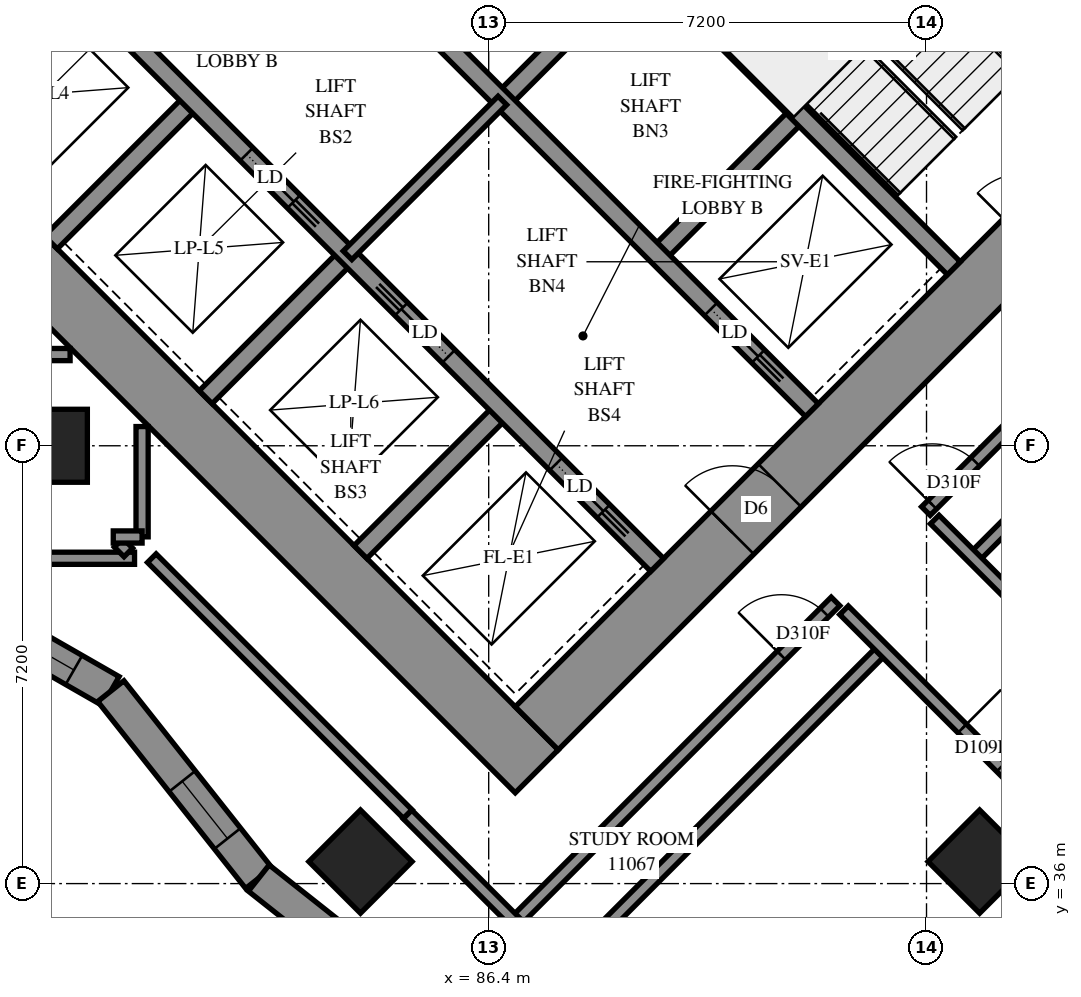
"""IFC4 building model, lengths in metres.
Left out: names, types, materials, properties, quantities, classifications, styles, units other than length and angle.
Written with IfcOpenShell. Run it as: python <this file> out.ifc"""

import sys

from ifc_helpers import new_model, si_unit, direction, frame, frame_2d, origin, origin_2d, place, context, subcontext, project, spatial, polyline, rectangle, outline, extrude, element, fill, save


model = new_model("IFC4")
c1 = context("Model", 3, precision=1e-05, world=origin(), true_north=direction((0.0, 1.0)))
c2 = subcontext(c1, "Body", "Model", "MODEL_VIEW")
j1 = project(units=[si_unit("LENGTHUNIT", "METRE"), si_unit("PLANEANGLEUNIT", "RADIAN")], contexts=[c1])
p1 = place(None, origin())
s1 = spatial("IfcSite", under=j1, at=p1, CompositionType="ELEMENT")
p2 = place(p1, origin())
s2 = spatial("IfcBuilding", under=s1, at=p2, CompositionType="ELEMENT")
p3 = place(p2, frame((0.0, 0.0, 44.0)))
s3 = spatial("IfcBuildingStorey", under=s2, at=p3, CompositionType="ELEMENT", Elevation=44.0)
for number, where, z_axis, x_axis in (
    (1, (79.2, 43.2, 0.0), (0.0, 0.0, 1.0), (1.0, 0.0, 0.0)),
    (2, (84.291, 36.362, 0.0), (0.0, 0.0, 1.0), (0.707, -0.707, 0.0)),
    (3, (94.474, 36.362, 0.0), (0.0, 0.0, 1.0), (0.707, -0.707, 0.0)),
):
    element("IfcColumn", number, at=place(p3, frame(where, z_axis=z_axis, x_axis=x_axis)), inside=s3, PredefinedType="COLUMN", context=c2, shape_type="SweptSolid", body=[
        extrude(rectangle(XDim=1.2, YDim=1.2, at=origin_2d()), origin(), (0.0, 0.0, 1.0), 3.1),
    ])
p4 = place(p3, frame((75.594, 49.443, -0.3), z_axis=(0.0, 0.0, 1.0), x_axis=(0.7071037324, -0.70710983, 0.0)))
e4 = element("IfcWall", 4, at=p4, inside=s3, PredefinedType="SHEAR", context=c2, shape_type="SweptSolid", body=[
    extrude(rectangle(XDim=16.4, YDim=1.0, at=frame_2d((8.2, 0.0))), origin(), (0.0, 0.0, 1.0), 2.7),
])
p5 = place(p3, frame((86.483, 60.333, -0.3), z_axis=(0.0, 0.0, 1.0), x_axis=(0.70710983, -0.7071037324, 0.0)))
e5 = element("IfcWall", 5, at=p5, inside=s3, PredefinedType="SHEAR", context=c2, shape_type="SweptSolid", body=[
    extrude(rectangle(XDim=16.4, YDim=1.0, at=frame_2d((8.2, 0.0))), origin(), (0.0, 0.0, 1.0), 2.7),
])
p6 = place(p5, frame((11.0, 0.0, 0.3)))
e6 = element("IfcOpeningElement", 6, at=p6, cuts=e5, PredefinedType="OPENING", context=c2, shape_type="SweptSolid", body=[
    extrude(rectangle(XDim=0.8, YDim=2.1, at=frame_2d((0.4, 1.05))), frame((0.0, 0.51, 0.0), z_axis=(0.0, -1.0, 0.0), x_axis=(1.0, 0.0, 0.0)), (0.0, 0.0, 1.0), 1.02),
])
p7 = place(p3, frame((76.301, 49.443, -0.3), z_axis=(0.0, 0.0, 1.0), x_axis=(0.7071067812, 0.7071067812, 0.0)))
e7 = element("IfcWall", 7, at=p7, inside=s3, PredefinedType="SHEAR", context=c2, shape_type="SweptSolid", body=[
    extrude(rectangle(XDim=14.4, YDim=1.0, at=frame_2d((7.2, 0.0))), origin(), (0.0, 0.0, 1.0), 2.7),
])
p8 = place(p7, frame((4.55, 0.0, 0.3)))
e8 = element("IfcOpeningElement", 8, at=p8, cuts=e7, PredefinedType="OPENING", context=c2, shape_type="SweptSolid", body=[
    extrude(rectangle(XDim=1.1, YDim=2.1, at=frame_2d((0.55, 1.05))), frame((0.0, 0.51, 0.0), z_axis=(0.0, -1.0, 0.0), x_axis=(1.0, 0.0, 0.0)), (0.0, 0.0, 1.0), 1.02),
])
p9 = place(p7, frame((11.35, 0.0, 0.3)))
e9 = element("IfcOpeningElement", 9, at=p9, cuts=e7, PredefinedType="OPENING", context=c2, shape_type="SweptSolid", body=[
    extrude(rectangle(XDim=1.1, YDim=2.1, at=frame_2d((0.55, 1.05))), frame((0.0, 0.51, 0.0), z_axis=(0.0, -1.0, 0.0), x_axis=(1.0, 0.0, 0.0)), (0.0, 0.0, 1.0), 1.02),
])
p10 = place(p3, frame((87.19, 38.554, -0.3), z_axis=(0.0, 0.0, 1.0), x_axis=(0.707103309, 0.7071102534, 0.0)))
e10 = element("IfcWall", 10, at=p10, inside=s3, PredefinedType="SHEAR", context=c2, shape_type="SweptSolid", body=[
    extrude(rectangle(XDim=14.4, YDim=1.0, at=frame_2d((7.2, 0.0))), origin(), (0.0, 0.0, 1.0), 2.7),
])
p11 = place(p10, frame((4.55, 0.0, 0.3)))
e11 = element("IfcOpeningElement", 11, at=p11, cuts=e10, PredefinedType="OPENING", context=c2, shape_type="SweptSolid", body=[
    extrude(rectangle(XDim=1.1, YDim=2.1, at=frame_2d((0.55, 1.05))), frame((0.0, 0.51, 0.0), z_axis=(0.0, -1.0, 0.0), x_axis=(1.0, 0.0, 0.0)), (0.0, 0.0, 1.0), 1.02),
])
p12 = place(p10, frame((11.35, 0.0, 0.3)))
e12 = element("IfcOpeningElement", 12, at=p12, cuts=e10, PredefinedType="OPENING", context=c2, shape_type="SweptSolid", body=[
    extrude(rectangle(XDim=1.1, YDim=2.1, at=frame_2d((0.55, 1.05))), frame((0.0, 0.51, 0.0), z_axis=(0.0, -1.0, 0.0), x_axis=(1.0, 0.0, 0.0)), (0.0, 0.0, 1.0), 1.02),
])
p13 = place(p3, frame((79.2, 46.544, 0.0), z_axis=(0.0, 0.0, 1.0), x_axis=(0.7071219326, 0.7070916295, 0.0)))
e13 = element("IfcWall", 13, at=p13, inside=s3, PredefinedType="SOLIDWALL", context=c2, shape_type="SweptSolid", body=[
    extrude(rectangle(XDim=3.3, YDim=0.3, at=frame_2d((1.65, 0.0))), origin(), (0.0, 0.0, 1.0), 3.1),
])
p14 = place(p3, frame((81.746, 43.999, 0.0), z_axis=(0.0, 0.0, 1.0), x_axis=(0.7071067812, 0.7071067812, 0.0)))
e14 = element("IfcWall", 14, at=p14, inside=s3, PredefinedType="SOLIDWALL", context=c2, shape_type="SweptSolid", body=[
    extrude(rectangle(XDim=3.3, YDim=0.3, at=frame_2d((1.65, 0.0))), origin(), (0.0, 0.0, 1.0), 3.1),
])
p15 = place(p3, frame((86.625, 48.878, 0.0), z_axis=(0.0, 0.0, 1.0), x_axis=(0.7071067812, 0.7071067812, 0.0)))
e15 = element("IfcWall", 15, at=p15, inside=s3, PredefinedType="SOLIDWALL", context=c2, shape_type="SweptSolid", body=[
    extrude(rectangle(XDim=3.3, YDim=0.3, at=frame_2d((1.65, 0.0))), origin(), (0.0, 0.0, 1.0), 3.1),
])
p16 = place(p3, frame((84.291, 41.453, 0.0), z_axis=(0.0, 0.0, 1.0), x_axis=(0.7071067812, 0.7071067812, 0.0)))
e16 = element("IfcWall", 16, at=p16, inside=s3, PredefinedType="SOLIDWALL", context=c2, shape_type="SweptSolid", body=[
    extrude(rectangle(XDim=3.3, YDim=0.3, at=frame_2d((1.65, 0.0))), origin(), (0.0, 0.0, 1.0), 3.1),
])
p17 = place(p3, frame((89.17, 46.332, 0.0), z_axis=(0.0, 0.0, 1.0), x_axis=(0.7071067812, 0.7071067812, 0.0)))
e17 = element("IfcWall", 17, at=p17, inside=s3, PredefinedType="SOLIDWALL", context=c2, shape_type="SweptSolid", body=[
    extrude(rectangle(XDim=3.3, YDim=0.3, at=frame_2d((1.65, 0.0))), origin(), (0.0, 0.0, 1.0), 3.1),
])
p18 = place(p3, frame((78.988, 51.423, 0.0), z_axis=(0.0, 0.0, 1.0), x_axis=(0.7071067812, -0.7071067812, 0.0)))
e18 = element("IfcWall", 18, at=p18, inside=s3, PredefinedType="SOLIDWALL", context=c2, shape_type="SweptSolid", body=[
    extrude(rectangle(XDim=14.4, YDim=0.3, at=frame_2d((7.2, 0.0))), origin(), (0.0, 0.0, 1.0), 3.1),
])
p19 = place(p18, frame((1.25, 0.0, 0.0)))
e19 = element("IfcOpeningElement", 19, at=p19, cuts=e18, PredefinedType="OPENING", context=c2, shape_type="SweptSolid", body=[
    extrude(rectangle(XDim=1.1, YDim=2.1, at=frame_2d((0.55, 1.05))), frame((0.0, 0.16, 0.0), z_axis=(0.0, -1.0, 0.0), x_axis=(1.0, 0.0, 0.0)), (0.0, 0.0, 1.0), 0.32),
])
p20 = place(p18, frame((4.85, 0.0, 0.0)))
e20 = element("IfcOpeningElement", 20, at=p20, cuts=e18, PredefinedType="OPENING", context=c2, shape_type="SweptSolid", body=[
    extrude(rectangle(XDim=1.1, YDim=2.1, at=frame_2d((0.55, 1.05))), frame((0.0, 0.16, 0.0), z_axis=(0.0, -1.0, 0.0), x_axis=(1.0, 0.0, 0.0)), (0.0, 0.0, 1.0), 0.32),
])
p21 = place(p18, frame((8.45, 0.0, 0.0)))
e21 = element("IfcOpeningElement", 21, at=p21, cuts=e18, PredefinedType="OPENING", context=c2, shape_type="SweptSolid", body=[
    extrude(rectangle(XDim=1.1, YDim=2.1, at=frame_2d((0.55, 1.05))), frame((0.0, 0.16, 0.0), z_axis=(0.0, -1.0, 0.0), x_axis=(1.0, 0.0, 0.0)), (0.0, 0.0, 1.0), 0.32),
])
p22 = place(p18, frame((12.05, 0.0, 0.0)))
e22 = element("IfcOpeningElement", 22, at=p22, cuts=e18, PredefinedType="OPENING", context=c2, shape_type="SweptSolid", body=[
    extrude(rectangle(XDim=1.1, YDim=2.1, at=frame_2d((0.55, 1.05))), frame((0.0, 0.16, 0.0), z_axis=(0.0, -1.0, 0.0), x_axis=(1.0, 0.0, 0.0)), (0.0, 0.0, 1.0), 0.32),
])
p23 = place(p3, frame((81.534, 53.969, 0.0), z_axis=(0.0, 0.0, 1.0), x_axis=(0.707103309, -0.7071102534, 0.0)))
e23 = element("IfcWall", 23, at=p23, inside=s3, PredefinedType="SOLIDWALL", context=c2, shape_type="SweptSolid", body=[
    extrude(rectangle(XDim=14.4, YDim=0.3, at=frame_2d((7.2, 0.0))), origin(), (0.0, 0.0, 1.0), 3.1),
])
p24 = place(p23, frame((12.05, 0.0, 0.0)))
e24 = element("IfcOpeningElement", 24, at=p24, cuts=e23, PredefinedType="OPENING", context=c2, shape_type="SweptSolid", body=[
    extrude(rectangle(XDim=1.1, YDim=2.1, at=frame_2d((0.55, 1.05))), frame((0.0, 0.16, 0.0), z_axis=(0.0, -1.0, 0.0), x_axis=(1.0, 0.0, 0.0)), (0.0, 0.0, 1.0), 0.32),
])
p25 = place(p3, frame((88.958, 51.211, 0.0), z_axis=(0.0, 0.0, 1.0), x_axis=(0.7070998367, -0.7071137256, 0.0)))
e25 = element("IfcWall", 25, at=p25, inside=s3, PredefinedType="SOLIDWALL", context=c2, shape_type="SweptSolid", body=[
    extrude(rectangle(XDim=7.2, YDim=0.3, at=frame_2d((3.6, 0.0))), origin(), (0.0, 0.0, 1.0), 3.1),
])
p26 = place(p3, frame((76.631, 41.203, 0.0), z_axis=(0.0, 0.0, 1.0), x_axis=(0.8675936053, -0.4972739044, 0.0)))
e26 = element("IfcWall", 26, at=p26, inside=s3, PredefinedType="SOLIDWALL", context=c2, shape_type="SweptSolid", body=[
    extrude(outline(polyline([(0.031, -0.275), (4.045, -0.275), (4.151, 0.275), (-0.031, 0.275), (0.031, -0.275)])), origin(), (0.0, 0.0, 1.0), 3.1),
])
p27 = place(p26, frame((2.198, 0.0, 0.5)))
e27 = element("IfcOpeningElement", 27, at=p27, cuts=e26, PredefinedType="OPENING", context=c2, shape_type="SweptSolid", body=[
    extrude(rectangle(XDim=1.2, YDim=2.45, at=frame_2d((0.6, 1.225))), frame((0.0, 0.285, 0.0), z_axis=(0.0, -1.0, 0.0), x_axis=(1.0, 0.0, 0.0)), (0.0, 0.0, 1.0), 0.57),
])
p28 = place(p26, frame((0.86, 0.0, 0.45)))
e28 = element("IfcOpeningElement", 28, at=p28, cuts=e26, PredefinedType="OPENING", context=c2, shape_type="SweptSolid", body=[
    extrude(rectangle(XDim=0.8, YDim=2.5, at=frame_2d((0.4, 1.25))), frame((0.0, 0.285, 0.0), z_axis=(0.0, -1.0, 0.0), x_axis=(1.0, 0.0, 0.0)), (0.0, 0.0, 1.0), 0.57),
])
p29 = place(p3, frame((80.186, 39.165, 0.0), z_axis=(0.0, 0.0, 1.0), x_axis=(0.6205840465, -0.7841399373, 0.0)))
e29 = element("IfcWall", 29, at=p29, inside=s3, PredefinedType="SOLIDWALL", context=c2, shape_type="SweptSolid", body=[
    extrude(outline(polyline([(0.053, -0.275), (3.953, -0.275), (3.889, 0.275), (-0.053, 0.275), (0.053, -0.275)])), origin(), (0.0, 0.0, 1.0), 3.1),
])
p30 = place(p29, frame((1.891, 0.0, 0.5)))
e30 = element("IfcOpeningElement", 30, at=p30, cuts=e29, PredefinedType="OPENING", context=c2, shape_type="SweptSolid", body=[
    extrude(rectangle(XDim=1.2, YDim=2.45, at=frame_2d((0.6, 1.225))), frame((0.0, 0.285, 0.0), z_axis=(0.0, -1.0, 0.0), x_axis=(1.0, 0.0, 0.0)), (0.0, 0.0, 1.0), 0.57),
])
p31 = place(p3, frame((82.619, 36.091, 0.0), z_axis=(0.0, 0.0, 1.0), x_axis=(0.7841326465, -0.6205932587, 0.0)))
e31 = element("IfcWall", 31, at=p31, inside=s3, PredefinedType="SOLIDWALL", context=c2, shape_type="SweptSolid", body=[
    extrude(outline(polyline([(-0.032, -0.275), (3.868, -0.275), (3.932, 0.275), (0.032, 0.275), (-0.032, -0.275)])), origin(), (0.0, 0.0, 1.0), 3.1),
])
p32 = place(p31, frame((1.749, 0.0, 0.5)))
e32 = element("IfcOpeningElement", 32, at=p32, cuts=e31, PredefinedType="OPENING", context=c2, shape_type="SweptSolid", body=[
    extrude(rectangle(XDim=1.2, YDim=2.45, at=frame_2d((0.6, 1.225))), frame((0.0, 0.285, 0.0), z_axis=(0.0, -1.0, 0.0), x_axis=(1.0, 0.0, 0.0)), (0.0, 0.0, 1.0), 0.57),
])
p33 = place(p3, frame((91.313, 53.354, 0.0), z_axis=(0.0, 0.0, 1.0), x_axis=(0.7071140275, -0.7070995348, 0.0)))
e33 = element("IfcWall", 33, at=p33, inside=s3, PredefinedType="PARTITIONING", context=c2, shape_type="SweptSolid", body=[
    extrude(rectangle(XDim=6.9, YDim=0.15, at=frame_2d((3.45, 0.0))), origin(), (0.0, 0.0, 1.0), 3.1),
])
p34 = place(p3, frame((84.079, 46.332, 0.0), z_axis=(0.0, 0.0, 1.0), x_axis=(0.7071067812, 0.7071067812, 0.0)))
e34 = element("IfcWall", 34, at=p34, inside=s3, PredefinedType="PARTITIONING", context=c2, shape_type="SweptSolid", body=[
    extrude(rectangle(XDim=3.6, YDim=0.2, at=frame_2d((1.8, 0.0))), origin(), (0.0, 0.0, 1.0), 3.1),
])
p35 = place(p3, frame((94.367, 41.349, 0.0), z_axis=(0.0, 0.0, 1.0), x_axis=(0.7071109781, 0.7071025843, 0.0)))
e35 = element("IfcWall", 35, at=p35, inside=s3, PredefinedType="PARTITIONING", context=c2, shape_type="SweptSolid", body=[
    extrude(rectangle(XDim=11.914, YDim=0.2, at=frame_2d((5.957, 0.0))), origin(), (0.0, 0.0, 1.0), 3.1),
])
p36 = place(p3, frame((93.59, 42.126, 0.0), z_axis=(0.0, 0.0, 1.0), x_axis=(0.7071067812, 0.7071067812, 0.0)))
e36 = element("IfcWall", 36, at=p36, inside=s3, PredefinedType="PARTITIONING", context=c2, shape_type="SweptSolid", body=[
    extrude(rectangle(XDim=9.849, YDim=0.2, at=frame_2d((4.924, 0.0))), origin(), (0.0, 0.0, 1.0), 3.1),
])
p37 = place(p36, frame((0.148, 0.0, 0.0)))
e37 = element("IfcOpeningElement", 37, at=p37, cuts=e36, PredefinedType="OPENING", context=c2, shape_type="SweptSolid", body=[
    extrude(rectangle(XDim=1.0, YDim=2.1, at=frame_2d((0.5, 1.05))), frame((0.0, 0.11, 0.0), z_axis=(0.0, -1.0, 0.0), x_axis=(1.0, 0.0, 0.0)), (0.0, 0.0, 1.0), 0.22),
])
p38 = place(p3, frame((86.324, 33.296, 0.0), z_axis=(0.0, 0.0, 1.0), x_axis=(0.7069990152, 0.7072145308, 0.0)))
e38 = element("IfcWall", 38, at=p38, inside=s3, PredefinedType="PARTITIONING", context=c2, shape_type="SweptSolid", body=[
    extrude(rectangle(XDim=9.28, YDim=0.2, at=frame_2d((4.64, 0.0))), origin(), (0.0, 0.0, 1.0), 3.1),
])
p39 = place(p3, frame((92.243, 40.495, 0.0), z_axis=(0.0, 0.0, 1.0), x_axis=(0.7071067812, -0.7071067812, 0.0)))
e39 = element("IfcWall", 39, at=p39, inside=s3, PredefinedType="PARTITIONING", context=c2, shape_type="SweptSolid", body=[
    extrude(rectangle(XDim=8.101, YDim=0.2, at=frame_2d((4.05, 0.0))), origin(), (0.0, 0.0, 1.0), 3.1),
])
p40 = place(p39, frame((2.75, 0.0, 0.0)))
e40 = element("IfcOpeningElement", 40, at=p40, cuts=e39, PredefinedType="OPENING", context=c2, shape_type="SweptSolid", body=[
    extrude(rectangle(XDim=0.9, YDim=2.1, at=frame_2d((0.45, 1.05))), frame((0.0, 0.11, 0.0), z_axis=(0.0, -1.0, 0.0), x_axis=(1.0, 0.0, 0.0)), (0.0, 0.0, 1.0), 0.22),
])
p41 = place(p3, frame((86.836, 35.372, 0.0), z_axis=(0.0, 0.0, 1.0), x_axis=(0.7071067812, 0.7071067812, 0.0)))
e41 = element("IfcWall", 41, at=p41, inside=s3, PredefinedType="PARTITIONING", context=c2, shape_type="SweptSolid", body=[
    extrude(rectangle(XDim=7.45, YDim=0.2, at=frame_2d((3.725, 0.0))), origin(), (0.0, 0.0, 1.0), 3.1),
])
p42 = place(p41, frame((6.192, 0.0, 0.0)))
e42 = element("IfcOpeningElement", 42, at=p42, cuts=e41, PredefinedType="OPENING", context=c2, shape_type="SweptSolid", body=[
    extrude(rectangle(XDim=1.0, YDim=2.1, at=frame_2d((0.5, 1.05))), frame((0.0, 0.11, 0.0), z_axis=(0.0, -1.0, 0.0), x_axis=(1.0, 0.0, 0.0)), (0.0, 0.0, 1.0), 0.22),
])
p43 = place(p3, frame((85.07, 37.142, 0.0), z_axis=(0.0, 0.0, 1.0), x_axis=(-0.7070899851, 0.7071235769, 0.0)))
e43 = element("IfcWall", 43, at=p43, inside=s3, PredefinedType="PARTITIONING", context=c2, shape_type="SweptSolid", body=[
    extrude(rectangle(XDim=5.954, YDim=0.2, at=frame_2d((2.977, 0.0))), origin(), (0.0, 0.0, 1.0), 3.1),
])
p44 = place(p3, frame((93.735, 41.987, 0.0), z_axis=(0.0, 0.0, 1.0), x_axis=(0.7071067812, -0.7071067812, 0.0)))
e44 = element("IfcWall", 44, at=p44, inside=s3, PredefinedType="PARTITIONING", context=c2, shape_type="SweptSolid", body=[
    extrude(rectangle(XDim=4.5, YDim=0.2, at=frame_2d((2.25, 0.0))), origin(), (0.0, 0.0, 1.0), 3.1),
])
p45 = place(p44, frame((3.274, 0.0, 0.0)))
e45 = element("IfcOpeningElement", 45, at=p45, cuts=e44, PredefinedType="OPENING", context=c2, shape_type="SweptSolid", body=[
    extrude(rectangle(XDim=1.0, YDim=2.1, at=frame_2d((0.5, 1.05))), frame((0.0, 0.11, 0.0), z_axis=(0.0, -1.0, 0.0), x_axis=(1.0, 0.0, 0.0)), (0.0, 0.0, 1.0), 0.22),
])
p46 = place(p3, frame((85.065, 37.137, 0.0), z_axis=(0.0, 0.0, 1.0), x_axis=(0.7071067812, -0.7071067812, 0.0)))
e46 = element("IfcWall", 46, at=p46, inside=s3, PredefinedType="PARTITIONING", context=c2, shape_type="SweptSolid", body=[
    extrude(rectangle(XDim=2.5, YDim=0.2, at=frame_2d((1.25, 0.0))), origin(), (0.0, 0.0, 1.0), 3.1),
])
p47 = place(p3, frame((94.511, 34.839, 0.0), z_axis=(0.0, 0.0, 1.0), x_axis=(0.7075233388, 0.706689978, 0.0)))
e47 = element("IfcWall", 47, at=p47, inside=s3, PredefinedType="PARTITIONING", context=c2, shape_type="SweptSolid", body=[
    extrude(rectangle(XDim=2.4, YDim=0.15, at=frame_2d((1.2, 0.0))), origin(), (0.0, 0.0, 1.0), 3.1),
])
for number, where, z_axis, x_axis in (
    (48, (77.702, 44.7, 0.0), (0.0, 0.0, 1.0), (1.0, 0.0, 0.0)),
    (49, (80.7, 41.702, 0.0), (0.0, 0.0, 1.0), (0.0, 1.0, 0.0)),
):
    element("IfcWall", number, at=place(p3, frame(where, z_axis=z_axis, x_axis=x_axis)), inside=s3, PredefinedType="PARTITIONING", context=c2, shape_type="SweptSolid", body=[
        extrude(rectangle(XDim=1.814, YDim=0.2, at=frame_2d((0.907, 0.0))), origin(), (0.0, 0.0, 1.0), 3.1),
    ])
p48 = place(p3, frame((79.098, 41.35, 0.0), z_axis=(0.0, 0.0, 1.0), x_axis=(1.0, 0.0, 0.0)))
e50 = element("IfcWall", 50, at=p48, inside=s3, PredefinedType="PARTITIONING", context=c2, shape_type="SweptSolid", body=[
    extrude(rectangle(XDim=1.478, YDim=0.2, at=frame_2d((0.739, 0.0))), origin(), (0.0, 0.0, 1.0), 3.1),
])
p49 = place(p3, frame((80.315, 41.605, 0.0), z_axis=(0.0, 0.0, 1.0), x_axis=(0.7071067812, -0.7071067812, 0.0)))
e51 = element("IfcWall", 51, at=p49, inside=s3, PredefinedType="PARTITIONING", context=c2, shape_type="SweptSolid", body=[
    extrude(rectangle(XDim=0.225, YDim=0.2, at=frame_2d((0.113, 0.0))), origin(), (0.0, 0.0, 1.0), 3.1),
])
p50 = place(p3, frame((80.226, 41.7, 0.0), z_axis=(0.0, 0.0, 1.0), x_axis=(1.0, 0.0, 0.0)))
e52 = element("IfcWall", 52, at=p50, inside=s3, PredefinedType="PARTITIONING", context=c2, shape_type="SweptSolid", body=[
    extrude(rectangle(XDim=0.474, YDim=0.2, at=frame_2d((0.237, 0.0))), origin(), (0.0, 0.0, 1.0), 3.1),
])
p51 = place(p27, origin())
e53 = element("IfcWindow", 53, at=p51, inside=s3, PartitioningType="SINGLE_PANEL", PredefinedType="WINDOW", context=c2, shape_type="SweptSolid", body=[
    extrude(rectangle(XDim=1.2, YDim=2.45, at=frame_2d((0.6, 1.225))), frame((0.0, 0.155, 0.0), z_axis=(0.0, -1.0, 0.0), x_axis=(1.0, 0.0, 0.0)), (0.0, 0.0, 1.0), 0.06),
])
fill(e27, e53)
p52 = place(p30, origin())
e54 = element("IfcWindow", 54, at=p52, inside=s3, PartitioningType="SINGLE_PANEL", PredefinedType="WINDOW", context=c2, shape_type="SweptSolid", body=[
    extrude(rectangle(XDim=1.2, YDim=2.45, at=frame_2d((0.6, 1.225))), frame((0.0, 0.155, 0.0), z_axis=(0.0, -1.0, 0.0), x_axis=(1.0, 0.0, 0.0)), (0.0, 0.0, 1.0), 0.06),
])
fill(e30, e54)
p53 = place(p11, origin())
e55 = element("IfcDoor", 55, at=p53, inside=s3, OperationType="DOUBLE_DOOR_SINGLE_SWING", PredefinedType="DOOR", context=c2, shape_type="SweptSolid", body=[
    extrude(rectangle(XDim=1.1, YDim=2.1, at=frame_2d((0.55, 1.05))), frame((0.0, 0.025, 0.0), z_axis=(0.0, -1.0, 0.0), x_axis=(1.0, 0.0, 0.0)), (0.0, 0.0, 1.0), 0.05),
])
fill(e11, e55)
p54 = place(p20, origin())
e56 = element("IfcDoor", 56, at=p54, inside=s3, OperationType="SLIDING_TO_RIGHT", PredefinedType="DOOR", context=c2, shape_type="SweptSolid", body=[
    extrude(rectangle(XDim=1.1, YDim=2.1, at=frame_2d((0.55, 1.05))), frame((0.0, 0.025, 0.0), z_axis=(0.0, -1.0, 0.0), x_axis=(1.0, 0.0, 0.0)), (0.0, 0.0, 1.0), 0.05),
])
fill(e20, e56)
p55 = place(p21, origin())
e57 = element("IfcDoor", 57, at=p55, inside=s3, OperationType="SLIDING_TO_LEFT", PredefinedType="DOOR", context=c2, shape_type="SweptSolid", body=[
    extrude(rectangle(XDim=1.1, YDim=2.1, at=frame_2d((0.55, 1.05))), frame((0.0, 0.025, 0.0), z_axis=(0.0, -1.0, 0.0), x_axis=(1.0, 0.0, 0.0)), (0.0, 0.0, 1.0), 0.05),
])
fill(e21, e57)
p56 = place(p22, origin())
e58 = element("IfcDoor", 58, at=p56, inside=s3, OperationType="SLIDING_TO_RIGHT", PredefinedType="DOOR", context=c2, shape_type="SweptSolid", body=[
    extrude(rectangle(XDim=1.1, YDim=2.1, at=frame_2d((0.55, 1.05))), frame((0.0, 0.025, 0.0), z_axis=(0.0, -1.0, 0.0), x_axis=(1.0, 0.0, 0.0)), (0.0, 0.0, 1.0), 0.05),
])
fill(e22, e58)
p57 = place(p24, origin())
e59 = element("IfcDoor", 59, at=p57, inside=s3, OperationType="SLIDING_TO_RIGHT", PredefinedType="DOOR", context=c2, shape_type="SweptSolid", body=[
    extrude(rectangle(XDim=1.1, YDim=2.1, at=frame_2d((0.55, 1.05))), frame((0.0, 0.025, 0.0), z_axis=(0.0, -1.0, 0.0), x_axis=(1.0, 0.0, 0.0)), (0.0, 0.0, 1.0), 0.05),
])
fill(e24, e59)
p58 = place(p37, origin())
e60 = element("IfcDoor", 60, at=p58, inside=s3, OperationType="SINGLE_SWING_LEFT", PredefinedType="DOOR", context=c2, shape_type="SweptSolid", body=[
    extrude(rectangle(XDim=1.0, YDim=2.1, at=frame_2d((0.5, 1.05))), frame((0.0, 0.025, 0.0), z_axis=(0.0, -1.0, 0.0), x_axis=(1.0, 0.0, 0.0)), (0.0, 0.0, 1.0), 0.05),
])
fill(e37, e60)
p59 = place(p42, origin())
e61 = element("IfcDoor", 61, at=p59, inside=s3, OperationType="SINGLE_SWING_RIGHT", PredefinedType="DOOR", context=c2, shape_type="SweptSolid", body=[
    extrude(rectangle(XDim=1.0, YDim=2.1, at=frame_2d((0.5, 1.05))), frame((0.0, 0.025, 0.0), z_axis=(0.0, -1.0, 0.0), x_axis=(1.0, 0.0, 0.0)), (0.0, 0.0, 1.0), 0.05),
])
fill(e42, e61)
p60 = place(p40, origin())
e62 = element("IfcDoor", 62, at=p60, inside=s3, OperationType="SINGLE_SWING_LEFT", PredefinedType="DOOR", context=c2, shape_type="SweptSolid", body=[
    extrude(rectangle(XDim=0.9, YDim=2.1, at=frame_2d((0.45, 1.05))), frame((0.0, 0.025, 0.0), z_axis=(0.0, -1.0, 0.0), x_axis=(1.0, 0.0, 0.0)), (0.0, 0.0, 1.0), 0.05),
])
fill(e40, e62)
save(model, sys.argv[1])
